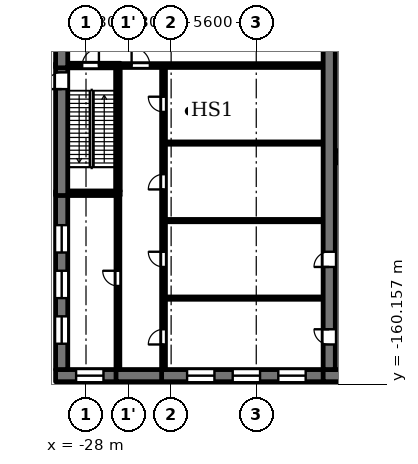
"""IFC4 building model, lengths in metres.
Left out: names, types, materials, properties, quantities, classifications, styles, units other than length and angle.
Written with IfcOpenShell. Run it as: python <this file> out.ifc"""

import sys

from ifc_helpers import new_model, si_unit, direction, frame, frame_2d, origin, place, context, subcontext, project, spatial, rectangle, extrude, element, fill, save


model = new_model("IFC4")
c1 = context("Model", 3, precision=1e-05, world=origin(), true_north=direction((0.0, 1.0)))
c2 = subcontext(c1, "Body", "Model", "MODEL_VIEW")
j1 = project(units=[si_unit("LENGTHUNIT", "METRE"), si_unit("PLANEANGLEUNIT", "RADIAN")], contexts=[c1])
p1 = place(None, origin())
s1 = spatial("IfcSite", under=j1, at=p1, CompositionType="ELEMENT")
p2 = place(p1, origin())
s2 = spatial("IfcBuilding", under=s1, at=p2, CompositionType="ELEMENT")
p3 = place(p2, origin())
s3 = spatial("IfcBuildingStorey", under=s2, at=p3, CompositionType="ELEMENT", Elevation=0.0)
p4 = place(p3, frame((-30.0, -159.6, 0.0), z_axis=(0.0, 0.0, 1.0), x_axis=(1.0, 0.0, 0.0)))
e1 = element("IfcWall", 1, at=p4, inside=s3, PredefinedType="SOLIDWALL", context=c2, shape_type="SweptSolid", body=[
    extrude(rectangle(XDim=4.225, YDim=0.8, at=frame_2d((2.112, 0.0))), origin(), (0.0, 0.0, 1.0), 6.15),
])
p5 = place(p4, frame((1.35, 0.0, 0.9)))
e2 = element("IfcOpeningElement", 2, at=p5, cuts=e1, PredefinedType="OPENING", context=c2, shape_type="SweptSolid", body=[
    extrude(rectangle(XDim=1.8, YDim=1.5, at=frame_2d((0.9, 0.75))), frame((0.0, 0.41, 0.0), z_axis=(0.0, -1.0, 0.0), x_axis=(1.0, 0.0, 0.0)), (0.0, 0.0, 1.0), 0.82),
])
p6 = place(p3, frame((-26.025, -159.6, 0.0), z_axis=(0.0, 0.0, 1.0), x_axis=(1.0, 0.0, 0.0)))
e3 = element("IfcWall", 3, at=p6, inside=s3, PredefinedType="SOLIDWALL", context=c2, shape_type="SweptSolid", body=[
    extrude(rectangle(XDim=3.25, YDim=0.8, at=frame_2d((1.625, 0.0))), origin(), (0.0, 0.0, 1.0), 6.15),
])
p7 = place(p3, frame((-23.025, -159.6, 0.0), z_axis=(0.0, 0.0, 1.0), x_axis=(1.0, 0.0, 0.0)))
e4 = element("IfcWall", 4, at=p7, inside=s3, PredefinedType="SOLIDWALL", context=c2, shape_type="SweptSolid", body=[
    extrude(rectangle(XDim=11.425, YDim=0.8, at=frame_2d((5.712, 0.0))), origin(), (0.0, 0.0, 1.0), 6.15),
])
p8 = place(p7, frame((1.675, 0.0, 0.9)))
e5 = element("IfcOpeningElement", 5, at=p8, cuts=e4, PredefinedType="OPENING", context=c2, shape_type="SweptSolid", body=[
    extrude(rectangle(XDim=1.8, YDim=1.5, at=frame_2d((0.9, 0.75))), frame((0.0, 0.41, 0.0), z_axis=(0.0, -1.0, 0.0), x_axis=(1.0, 0.0, 0.0)), (0.0, 0.0, 1.0), 0.82),
])
p9 = place(p7, frame((4.675, 0.0, 0.9)))
e6 = element("IfcOpeningElement", 6, at=p9, cuts=e4, PredefinedType="OPENING", context=c2, shape_type="SweptSolid", body=[
    extrude(rectangle(XDim=1.8, YDim=1.5, at=frame_2d((0.9, 0.75))), frame((0.0, 0.41, 0.0), z_axis=(0.0, -1.0, 0.0), x_axis=(1.0, 0.0, 0.0)), (0.0, 0.0, 1.0), 0.82),
])
p10 = place(p7, frame((7.675, 0.0, 0.9)))
e7 = element("IfcOpeningElement", 7, at=p10, cuts=e4, PredefinedType="OPENING", context=c2, shape_type="SweptSolid", body=[
    extrude(rectangle(XDim=1.8, YDim=1.5, at=frame_2d((0.9, 0.75))), frame((0.0, 0.41, 0.0), z_axis=(0.0, -1.0, 0.0), x_axis=(1.0, 0.0, 0.0)), (0.0, 0.0, 1.0), 0.82),
])
p11 = place(p3, frame((-12.4, -159.6, 0.0), z_axis=(0.0, 0.0, 1.0), x_axis=(1.0, 0.0, 0.0)))
e8 = element("IfcWall", 8, at=p11, inside=s3, PredefinedType="SOLIDWALL", context=c2, shape_type="SweptSolid", body=[
    extrude(rectangle(XDim=24.8, YDim=0.8, at=frame_2d((12.4, 0.0))), origin(), (0.0, 0.0, 1.0), 6.5),
])
for number, where, z_axis, x_axis in (
    (9, (-22.775, -154.5, 0.0), (0.0, 0.0, 1.0), (1.0, 0.0, 0.0)),
    (10, (-22.775, -149.4, 0.0), (0.0, 0.0, 1.0), (1.0, 0.0, 0.0)),
):
    element("IfcWall", number, at=place(p3, frame(where, z_axis=z_axis, x_axis=x_axis)), inside=s3, PredefinedType="PARTITIONING", context=c2, shape_type="SweptSolid", body=[
        extrude(rectangle(XDim=10.375, YDim=0.15, at=frame_2d((5.188, 0.0))), origin(), (0.0, 0.0, 1.0), 6.15),
    ])
p12 = place(p3, frame((-29.2, -147.6, 0.0), z_axis=(0.0, 0.0, 1.0), x_axis=(1.0, 0.0, 0.0)))
e11 = element("IfcWall", 11, at=p12, inside=s3, PredefinedType="SOLIDWALL", context=c2, shape_type="SweptSolid", body=[
    extrude(rectangle(XDim=3.45, YDim=0.3, at=frame_2d((1.725, 0.0))), origin(), (0.0, 0.0, 1.0), 6.15),
])
p13 = place(p3, frame((-11.6, -145.2, 0.0), z_axis=(0.0, 0.0, 1.0), x_axis=(1.0, 0.0, 0.0)))
e12 = element("IfcWall", 12, at=p13, inside=s3, PredefinedType="SOLIDWALL", context=c2, shape_type="SweptSolid", body=[
    extrude(rectangle(XDim=4.6, YDim=0.8, at=frame_2d((2.3, 0.0))), origin(), (0.0, 0.0, 1.0), 6.5),
])
p14 = place(p3, frame((-22.775, -144.3, 0.0), z_axis=(0.0, 0.0, 1.0), x_axis=(1.0, 0.0, 0.0)))
e13 = element("IfcWall", 13, at=p14, inside=s3, PredefinedType="PARTITIONING", context=c2, shape_type="SweptSolid", body=[
    extrude(rectangle(XDim=10.375, YDim=0.15, at=frame_2d((5.188, 0.0))), origin(), (0.0, 0.0, 1.0), 6.15),
])
p15 = place(p3, frame((-29.2, -139.2, 0.0), z_axis=(0.0, 0.0, 1.0), x_axis=(1.0, 0.0, 0.0)))
e14 = element("IfcWall", 14, at=p15, inside=s3, PredefinedType="SOLIDWALL", context=c2, shape_type="SweptSolid", body=[
    extrude(rectangle(XDim=3.45, YDim=0.3, at=frame_2d((1.725, 0.0))), origin(), (0.0, 0.0, 1.0), 6.15),
])
p16 = place(p15, frame((0.95, 0.0, 0.0)))
e15 = element("IfcOpeningElement", 15, at=p16, cuts=e14, PredefinedType="OPENING", context=c2, shape_type="SweptSolid", body=[
    extrude(rectangle(XDim=1.1, YDim=2.1, at=frame_2d((0.55, 1.05))), frame((0.0, 0.16, 0.0), z_axis=(0.0, -1.0, 0.0), x_axis=(1.0, 0.0, 0.0)), (0.0, 0.0, 1.0), 0.32),
])
p17 = place(p3, frame((-25.75, -139.2, 0.0), z_axis=(0.0, 0.0, 1.0), x_axis=(1.0, 0.0, 0.0)))
e16 = element("IfcWall", 16, at=p17, inside=s3, PredefinedType="SOLIDWALL", context=c2, shape_type="SweptSolid", body=[
    extrude(rectangle(XDim=13.35, YDim=0.25, at=frame_2d((6.675, 0.0))), origin(), (0.0, 0.0, 1.0), 6.15),
])
p18 = place(p17, frame((0.75, 0.0, 0.0)))
e17 = element("IfcOpeningElement", 17, at=p18, cuts=e16, PredefinedType="OPENING", context=c2, shape_type="SweptSolid", body=[
    extrude(rectangle(XDim=1.2, YDim=2.1, at=frame_2d((0.6, 1.05))), frame((0.0, 0.135, 0.0), z_axis=(0.0, -1.0, 0.0), x_axis=(1.0, 0.0, 0.0)), (0.0, 0.0, 1.0), 0.27),
])
p19 = place(p3, frame((-29.6, -159.2, 0.0), z_axis=(0.0, 0.0, 1.0), x_axis=(0.0, 1.0, 0.0)))
e18 = element("IfcWall", 18, at=p19, inside=s3, PredefinedType="SOLIDWALL", context=c2, shape_type="SweptSolid", body=[
    extrude(rectangle(XDim=11.75, YDim=0.8, at=frame_2d((5.875, 0.0))), origin(), (0.0, 0.0, 1.0), 6.15),
])
p20 = place(p19, frame((1.7, 0.0, 0.9)))
e19 = element("IfcOpeningElement", 19, at=p20, cuts=e18, PredefinedType="OPENING", context=c2, shape_type="SweptSolid", body=[
    extrude(rectangle(XDim=1.8, YDim=1.5, at=frame_2d((0.9, 0.75))), frame((0.0, 0.41, 0.0), z_axis=(0.0, -1.0, 0.0), x_axis=(1.0, 0.0, 0.0)), (0.0, 0.0, 1.0), 0.82),
])
p21 = place(p19, frame((4.7, 0.0, 0.9)))
e20 = element("IfcOpeningElement", 20, at=p21, cuts=e18, PredefinedType="OPENING", context=c2, shape_type="SweptSolid", body=[
    extrude(rectangle(XDim=1.8, YDim=1.5, at=frame_2d((0.9, 0.75))), frame((0.0, 0.41, 0.0), z_axis=(0.0, -1.0, 0.0), x_axis=(1.0, 0.0, 0.0)), (0.0, 0.0, 1.0), 0.82),
])
p22 = place(p19, frame((7.7, 0.0, 0.9)))
e21 = element("IfcOpeningElement", 21, at=p22, cuts=e18, PredefinedType="OPENING", context=c2, shape_type="SweptSolid", body=[
    extrude(rectangle(XDim=1.8, YDim=1.5, at=frame_2d((0.9, 0.75))), frame((0.0, 0.41, 0.0), z_axis=(0.0, -1.0, 0.0), x_axis=(1.0, 0.0, 0.0)), (0.0, 0.0, 1.0), 0.82),
])
p23 = place(p3, frame((-29.6, -147.75, 0.0), z_axis=(0.0, 0.0, 1.0), x_axis=(0.0, 1.0, 0.0)))
e22 = element("IfcWall", 22, at=p23, inside=s3, PredefinedType="SOLIDWALL", context=c2, shape_type="SweptSolid", body=[
    extrude(rectangle(XDim=8.7, YDim=0.8, at=frame_2d((4.35, 0.0))), origin(), (0.0, 0.0, 1.0), 6.15),
])
p24 = place(p23, frame((7.0, 0.0, 0.0)))
e23 = element("IfcOpeningElement", 23, at=p24, cuts=e22, PredefinedType="OPENING", context=c2, shape_type="SweptSolid", body=[
    extrude(rectangle(XDim=1.1, YDim=2.1, at=frame_2d((0.55, 1.05))), frame((0.0, 0.41, 0.0), z_axis=(0.0, -1.0, 0.0), x_axis=(1.0, 0.0, 0.0)), (0.0, 0.0, 1.0), 0.82),
])
p25 = place(p3, frame((-29.6, -139.35, 0.0), z_axis=(0.0, 0.0, 1.0), x_axis=(0.0, 1.0, 0.0)))
e24 = element("IfcWall", 24, at=p25, inside=s3, PredefinedType="SOLIDWALL", context=c2, shape_type="SweptSolid", body=[
    extrude(rectangle(XDim=8.275, YDim=0.8, at=frame_2d((4.137, 0.0))), origin(), (0.0, 0.0, 1.0), 6.15),
])
p26 = place(p25, frame((2.75, 0.0, 0.0)))
e25 = element("IfcOpeningElement", 25, at=p26, cuts=e24, PredefinedType="OPENING", context=c2, shape_type="SweptSolid", body=[
    extrude(rectangle(XDim=1.8, YDim=2.1, at=frame_2d((0.9, 1.05))), frame((0.0, 0.41, 0.0), z_axis=(0.0, -1.0, 0.0), x_axis=(1.0, 0.0, 0.0)), (0.0, 0.0, 1.0), 0.82),
])
p27 = place(p3, frame((-25.9, -159.2, 0.0), z_axis=(0.0, 0.0, 1.0), x_axis=(0.0, 1.0, 0.0)))
e26 = element("IfcWall", 26, at=p27, inside=s3, PredefinedType="SOLIDWALL", context=c2, shape_type="SweptSolid", body=[
    extrude(rectangle(XDim=11.45, YDim=0.25, at=frame_2d((5.725, 0.0))), origin(), (0.0, 0.0, 1.0), 6.15),
])
p28 = place(p27, frame((5.5, 0.0, 0.0)))
e27 = element("IfcOpeningElement", 27, at=p28, cuts=e26, PredefinedType="OPENING", context=c2, shape_type="SweptSolid", body=[
    extrude(rectangle(XDim=1.0, YDim=2.1, at=frame_2d((0.5, 1.05))), frame((0.0, 0.135, 0.0), z_axis=(0.0, -1.0, 0.0), x_axis=(1.0, 0.0, 0.0)), (0.0, 0.0, 1.0), 0.27),
])
p29 = place(p3, frame((-25.9, -147.45, 0.0), z_axis=(0.0, 0.0, 1.0), x_axis=(0.0, 1.0, 0.0)))
e28 = element("IfcWall", 28, at=p29, inside=s3, PredefinedType="SOLIDWALL", context=c2, shape_type="SweptSolid", body=[
    extrude(rectangle(XDim=8.225, YDim=0.3, at=frame_2d((4.112, 0.0))), origin(), (0.0, 0.0, 1.0), 6.15),
])
p30 = place(p3, frame((-22.9, -159.2, 0.0), z_axis=(0.0, 0.0, 1.0), x_axis=(0.0, 1.0, 0.0)))
e29 = element("IfcWall", 29, at=p30, inside=s3, PredefinedType="SOLIDWALL", context=c2, shape_type="SweptSolid", body=[
    extrude(rectangle(XDim=19.875, YDim=0.25, at=frame_2d((9.938, 0.0))), origin(), (0.0, 0.0, 1.0), 6.15),
])
p31 = place(p30, frame((16.95, 0.0, 0.0)))
e30 = element("IfcOpeningElement", 30, at=p31, cuts=e29, PredefinedType="OPENING", context=c2, shape_type="SweptSolid", body=[
    extrude(rectangle(XDim=1.0, YDim=2.1, at=frame_2d((0.5, 1.05))), frame((0.0, 0.135, 0.0), z_axis=(0.0, -1.0, 0.0), x_axis=(1.0, 0.0, 0.0)), (0.0, 0.0, 1.0), 0.27),
])
p32 = place(p30, frame((11.85, 0.0, 0.0)))
e31 = element("IfcOpeningElement", 31, at=p32, cuts=e29, PredefinedType="OPENING", context=c2, shape_type="SweptSolid", body=[
    extrude(rectangle(XDim=1.0, YDim=2.1, at=frame_2d((0.5, 1.05))), frame((0.0, 0.135, 0.0), z_axis=(0.0, -1.0, 0.0), x_axis=(1.0, 0.0, 0.0)), (0.0, 0.0, 1.0), 0.27),
])
p33 = place(p30, frame((6.75, 0.0, 0.0)))
e32 = element("IfcOpeningElement", 32, at=p33, cuts=e29, PredefinedType="OPENING", context=c2, shape_type="SweptSolid", body=[
    extrude(rectangle(XDim=1.0, YDim=2.1, at=frame_2d((0.5, 1.05))), frame((0.0, 0.135, 0.0), z_axis=(0.0, -1.0, 0.0), x_axis=(1.0, 0.0, 0.0)), (0.0, 0.0, 1.0), 0.27),
])
p34 = place(p30, frame((1.65, 0.0, 0.0)))
e33 = element("IfcOpeningElement", 33, at=p34, cuts=e29, PredefinedType="OPENING", context=c2, shape_type="SweptSolid", body=[
    extrude(rectangle(XDim=1.0, YDim=2.1, at=frame_2d((0.5, 1.05))), frame((0.0, 0.135, 0.0), z_axis=(0.0, -1.0, 0.0), x_axis=(1.0, 0.0, 0.0)), (0.0, 0.0, 1.0), 0.27),
])
p35 = place(p3, frame((-12.0, -159.2, 0.0), z_axis=(0.0, 0.0, 1.0), x_axis=(0.0, 1.0, 0.0)))
e34 = element("IfcWall", 34, at=p35, inside=s3, PredefinedType="SOLIDWALL", context=c2, shape_type="SweptSolid", body=[
    extrude(rectangle(XDim=34.125, YDim=0.8, at=frame_2d((17.062, 0.0))), origin(), (0.0, 0.0, 1.0), 6.5),
])
p36 = place(p35, frame((21.6, 0.0, 0.0)))
e35 = element("IfcOpeningElement", 35, at=p36, cuts=e34, PredefinedType="OPENING", context=c2, shape_type="SweptSolid", body=[
    extrude(rectangle(XDim=1.8, YDim=2.2, at=frame_2d((0.9, 1.1))), frame((0.0, 0.41, 0.0), z_axis=(0.0, -1.0, 0.0), x_axis=(1.0, 0.0, 0.0)), (0.0, 0.0, 1.0), 0.82),
])
p37 = place(p35, frame((25.1, 0.0, 0.0)))
e36 = element("IfcOpeningElement", 36, at=p37, cuts=e34, PredefinedType="OPENING", context=c2, shape_type="SweptSolid", body=[
    extrude(rectangle(XDim=1.8, YDim=2.2, at=frame_2d((0.9, 1.1))), frame((0.0, 0.41, 0.0), z_axis=(0.0, -1.0, 0.0), x_axis=(1.0, 0.0, 0.0)), (0.0, 0.0, 1.0), 0.82),
])
p38 = place(p35, frame((6.75, 0.0, 0.0)))
e37 = element("IfcOpeningElement", 37, at=p38, cuts=e34, PredefinedType="OPENING", context=c2, shape_type="SweptSolid", body=[
    extrude(rectangle(XDim=1.0, YDim=2.1, at=frame_2d((0.5, 1.05))), frame((0.0, 0.41, 0.0), z_axis=(0.0, -1.0, 0.0), x_axis=(1.0, 0.0, 0.0)), (0.0, 0.0, 1.0), 0.82),
])
p39 = place(p35, frame((1.65, 0.0, 0.0)))
e38 = element("IfcOpeningElement", 38, at=p39, cuts=e34, PredefinedType="OPENING", context=c2, shape_type="SweptSolid", body=[
    extrude(rectangle(XDim=1.0, YDim=2.1, at=frame_2d((0.5, 1.05))), frame((0.0, 0.41, 0.0), z_axis=(0.0, -1.0, 0.0), x_axis=(1.0, 0.0, 0.0)), (0.0, 0.0, 1.0), 0.82),
])
p40 = place(p24, origin())
e39 = element("IfcDoor", 39, at=p40, inside=s3, OperationType="SINGLE_SWING_LEFT", PredefinedType="DOOR", context=c2, shape_type="SweptSolid", body=[
    extrude(rectangle(XDim=1.1, YDim=2.1, at=frame_2d((0.55, 1.05))), frame((0.0, 0.025, 0.0), z_axis=(0.0, -1.0, 0.0), x_axis=(1.0, 0.0, 0.0)), (0.0, 0.0, 1.0), 0.05),
])
fill(e23, e39)
p41 = place(p20, origin())
e40 = element("IfcWindow", 40, at=p41, inside=s3, PartitioningType="SINGLE_PANEL", PredefinedType="WINDOW", context=c2, shape_type="SweptSolid", body=[
    extrude(rectangle(XDim=1.8, YDim=1.5, at=frame_2d((0.9, 0.75))), frame((0.0, 0.03, 0.0), z_axis=(0.0, -1.0, 0.0), x_axis=(1.0, 0.0, 0.0)), (0.0, 0.0, 1.0), 0.06),
])
fill(e19, e40)
p42 = place(p21, origin())
e41 = element("IfcWindow", 41, at=p42, inside=s3, PartitioningType="SINGLE_PANEL", PredefinedType="WINDOW", context=c2, shape_type="SweptSolid", body=[
    extrude(rectangle(XDim=1.8, YDim=1.5, at=frame_2d((0.9, 0.75))), frame((0.0, 0.03, 0.0), z_axis=(0.0, -1.0, 0.0), x_axis=(1.0, 0.0, 0.0)), (0.0, 0.0, 1.0), 0.06),
])
fill(e20, e41)
p43 = place(p22, origin())
e42 = element("IfcWindow", 42, at=p43, inside=s3, PartitioningType="SINGLE_PANEL", PredefinedType="WINDOW", context=c2, shape_type="SweptSolid", body=[
    extrude(rectangle(XDim=1.8, YDim=1.5, at=frame_2d((0.9, 0.75))), frame((0.0, 0.03, 0.0), z_axis=(0.0, -1.0, 0.0), x_axis=(1.0, 0.0, 0.0)), (0.0, 0.0, 1.0), 0.06),
])
fill(e21, e42)
p44 = place(p5, origin())
e43 = element("IfcWindow", 43, at=p44, inside=s3, PartitioningType="SINGLE_PANEL", PredefinedType="WINDOW", context=c2, shape_type="SweptSolid", body=[
    extrude(rectangle(XDim=1.8, YDim=1.5, at=frame_2d((0.9, 0.75))), frame((0.0, 0.03, 0.0), z_axis=(0.0, -1.0, 0.0), x_axis=(1.0, 0.0, 0.0)), (0.0, 0.0, 1.0), 0.06),
])
fill(e2, e43)
p45 = place(p8, origin())
e44 = element("IfcWindow", 44, at=p45, inside=s3, PartitioningType="SINGLE_PANEL", PredefinedType="WINDOW", context=c2, shape_type="SweptSolid", body=[
    extrude(rectangle(XDim=1.8, YDim=1.5, at=frame_2d((0.9, 0.75))), frame((0.0, 0.03, 0.0), z_axis=(0.0, -1.0, 0.0), x_axis=(1.0, 0.0, 0.0)), (0.0, 0.0, 1.0), 0.06),
])
fill(e5, e44)
p46 = place(p9, origin())
e45 = element("IfcWindow", 45, at=p46, inside=s3, PartitioningType="SINGLE_PANEL", PredefinedType="WINDOW", context=c2, shape_type="SweptSolid", body=[
    extrude(rectangle(XDim=1.8, YDim=1.5, at=frame_2d((0.9, 0.75))), frame((0.0, 0.03, 0.0), z_axis=(0.0, -1.0, 0.0), x_axis=(1.0, 0.0, 0.0)), (0.0, 0.0, 1.0), 0.06),
])
fill(e6, e45)
p47 = place(p10, origin())
e46 = element("IfcWindow", 46, at=p47, inside=s3, PartitioningType="SINGLE_PANEL", PredefinedType="WINDOW", context=c2, shape_type="SweptSolid", body=[
    extrude(rectangle(XDim=1.8, YDim=1.5, at=frame_2d((0.9, 0.75))), frame((0.0, 0.03, 0.0), z_axis=(0.0, -1.0, 0.0), x_axis=(1.0, 0.0, 0.0)), (0.0, 0.0, 1.0), 0.06),
])
fill(e7, e46)
p48 = place(p16, origin())
e47 = element("IfcDoor", 47, at=p48, inside=s3, OperationType="SINGLE_SWING_RIGHT", PredefinedType="DOOR", context=c2, shape_type="SweptSolid", body=[
    extrude(rectangle(XDim=1.1, YDim=2.1, at=frame_2d((0.55, 1.05))), frame((0.0, 0.025, 0.0), z_axis=(0.0, -1.0, 0.0), x_axis=(1.0, 0.0, 0.0)), (0.0, 0.0, 1.0), 0.05),
])
fill(e15, e47)
p49 = place(p18, origin())
e48 = element("IfcDoor", 48, at=p49, inside=s3, OperationType="SINGLE_SWING_LEFT", PredefinedType="DOOR", context=c2, shape_type="SweptSolid", body=[
    extrude(rectangle(XDim=1.2, YDim=2.1, at=frame_2d((0.6, 1.05))), frame((0.0, 0.025, 0.0), z_axis=(0.0, -1.0, 0.0), x_axis=(1.0, 0.0, 0.0)), (0.0, 0.0, 1.0), 0.05),
])
fill(e17, e48)
p50 = place(p31, origin())
e49 = element("IfcDoor", 49, at=p50, inside=s3, OperationType="SINGLE_SWING_RIGHT", PredefinedType="DOOR", context=c2, shape_type="SweptSolid", body=[
    extrude(rectangle(XDim=1.0, YDim=2.1, at=frame_2d((0.5, 1.05))), frame((0.0, 0.025, 0.0), z_axis=(0.0, -1.0, 0.0), x_axis=(1.0, 0.0, 0.0)), (0.0, 0.0, 1.0), 0.05),
])
fill(e30, e49)
p51 = place(p32, origin())
e50 = element("IfcDoor", 50, at=p51, inside=s3, OperationType="SINGLE_SWING_LEFT", PredefinedType="DOOR", context=c2, shape_type="SweptSolid", body=[
    extrude(rectangle(XDim=1.0, YDim=2.1, at=frame_2d((0.5, 1.05))), frame((0.0, 0.025, 0.0), z_axis=(0.0, -1.0, 0.0), x_axis=(1.0, 0.0, 0.0)), (0.0, 0.0, 1.0), 0.05),
])
fill(e31, e50)
p52 = place(p33, origin())
e51 = element("IfcDoor", 51, at=p52, inside=s3, OperationType="SINGLE_SWING_RIGHT", PredefinedType="DOOR", context=c2, shape_type="SweptSolid", body=[
    extrude(rectangle(XDim=1.0, YDim=2.1, at=frame_2d((0.5, 1.05))), frame((0.0, 0.025, 0.0), z_axis=(0.0, -1.0, 0.0), x_axis=(1.0, 0.0, 0.0)), (0.0, 0.0, 1.0), 0.05),
])
fill(e32, e51)
p53 = place(p34, origin())
e52 = element("IfcDoor", 52, at=p53, inside=s3, OperationType="SINGLE_SWING_LEFT", PredefinedType="DOOR", context=c2, shape_type="SweptSolid", body=[
    extrude(rectangle(XDim=1.0, YDim=2.1, at=frame_2d((0.5, 1.05))), frame((0.0, 0.025, 0.0), z_axis=(0.0, -1.0, 0.0), x_axis=(1.0, 0.0, 0.0)), (0.0, 0.0, 1.0), 0.05),
])
fill(e33, e52)
p54 = place(p28, origin())
e53 = element("IfcDoor", 53, at=p54, inside=s3, OperationType="SINGLE_SWING_RIGHT", PredefinedType="DOOR", context=c2, shape_type="SweptSolid", body=[
    extrude(rectangle(XDim=1.0, YDim=2.1, at=frame_2d((0.5, 1.05))), frame((0.0, 0.025, 0.0), z_axis=(0.0, -1.0, 0.0), x_axis=(1.0, 0.0, 0.0)), (0.0, 0.0, 1.0), 0.05),
])
fill(e27, e53)
p55 = place(p38, origin())
e54 = element("IfcDoor", 54, at=p55, inside=s3, OperationType="SINGLE_SWING_LEFT", PredefinedType="DOOR", context=c2, shape_type="SweptSolid", body=[
    extrude(rectangle(XDim=1.0, YDim=2.1, at=frame_2d((0.5, 1.05))), frame((0.0, 0.025, 0.0), z_axis=(0.0, -1.0, 0.0), x_axis=(1.0, 0.0, 0.0)), (0.0, 0.0, 1.0), 0.05),
])
fill(e37, e54)
p56 = place(p39, origin())
e55 = element("IfcDoor", 55, at=p56, inside=s3, OperationType="SINGLE_SWING_RIGHT", PredefinedType="DOOR", context=c2, shape_type="SweptSolid", body=[
    extrude(rectangle(XDim=1.0, YDim=2.1, at=frame_2d((0.5, 1.05))), frame((0.0, 0.025, 0.0), z_axis=(0.0, -1.0, 0.0), x_axis=(1.0, 0.0, 0.0)), (0.0, 0.0, 1.0), 0.05),
])
fill(e38, e55)
save(model, sys.argv[1])
